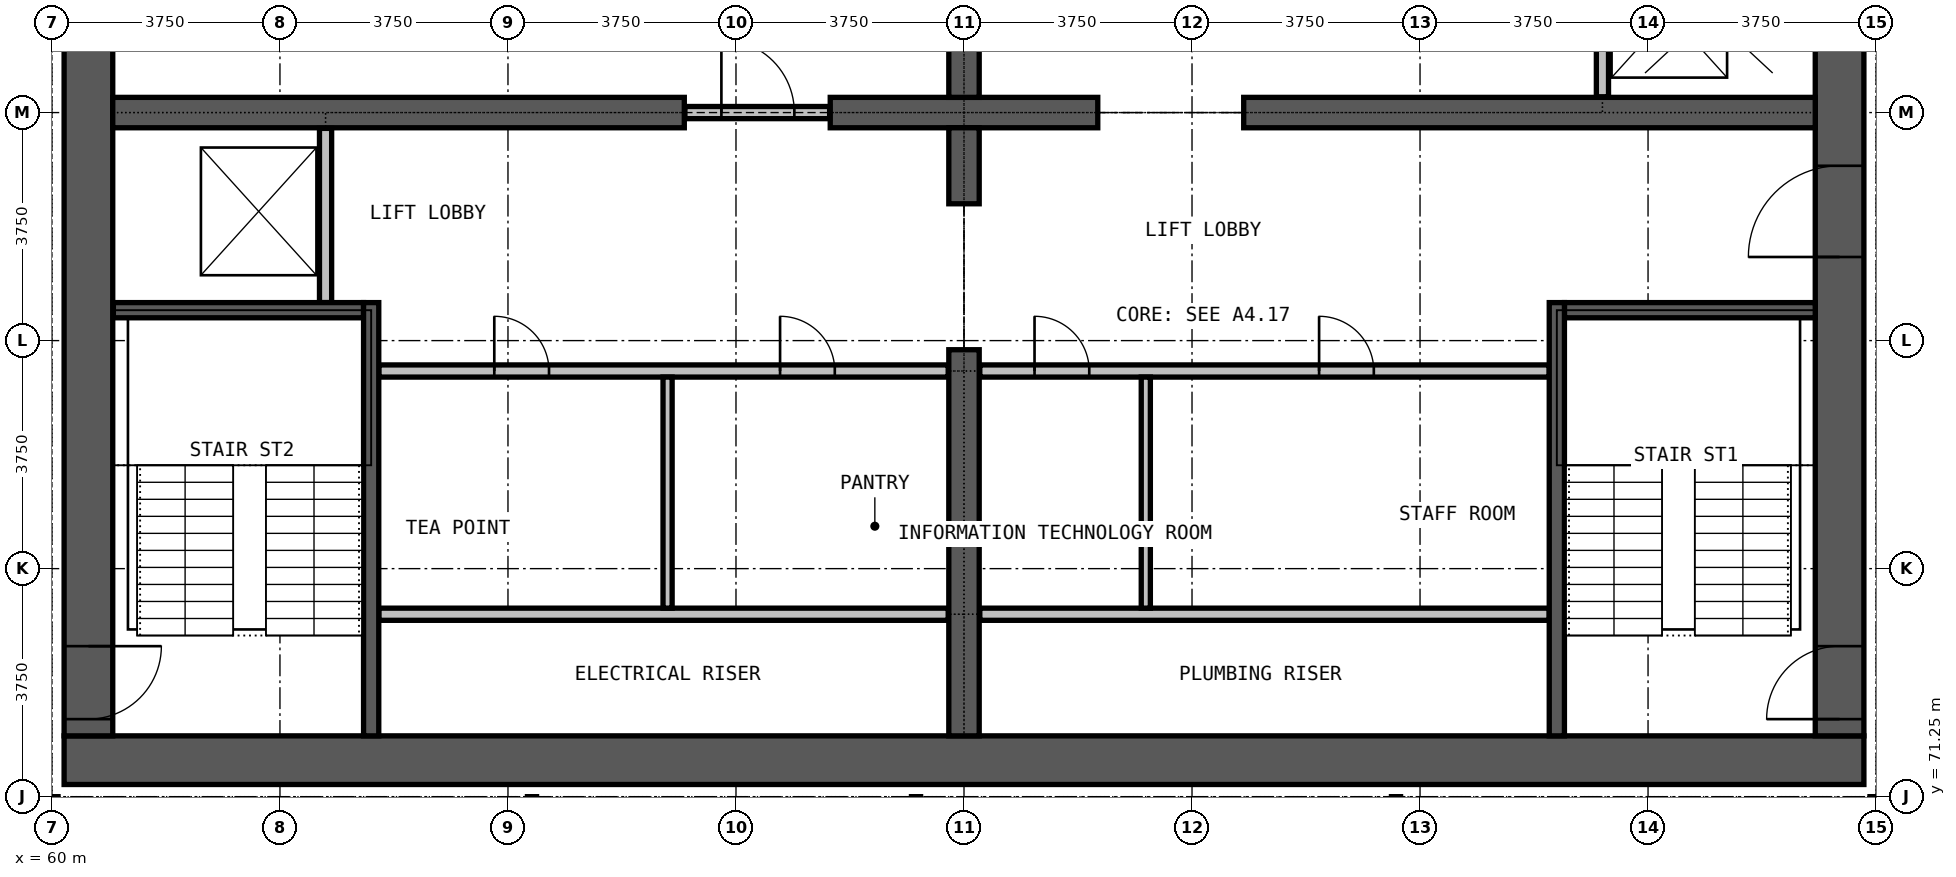
"""IFC4 building model, lengths in metres.
Left out: names, types, materials, properties, quantities, classifications, styles, units other than length and angle.
Written with IfcOpenShell. Run it as: python <this file> out.ifc"""

import sys

from ifc_helpers import new_model, si_unit, direction, frame, frame_2d, origin, place, context, subcontext, project, spatial, rectangle, extrude, element, fill, save


model = new_model("IFC4")
c1 = context("Model", 3, precision=1e-05, world=origin(), true_north=direction((0.0, 1.0)))
c2 = subcontext(c1, "Body", "Model", "MODEL_VIEW")
j1 = project(units=[si_unit("LENGTHUNIT", "METRE"), si_unit("PLANEANGLEUNIT", "RADIAN")], contexts=[c1])
p1 = place(None, origin())
s1 = spatial("IfcSite", under=j1, at=p1, CompositionType="ELEMENT")
p2 = place(p1, origin())
s2 = spatial("IfcBuilding", under=s1, at=p2, CompositionType="ELEMENT")
p3 = place(p2, frame((0.0, 0.0, 165.7)))
s3 = spatial("IfcBuildingStorey", under=s2, at=p3, CompositionType="ELEMENT", Elevation=165.7)
p4 = place(p3, frame((60.2, 71.85, 0.0), z_axis=(0.0, 0.0, 1.0), x_axis=(1.0, 0.0, 0.0)))
e1 = element("IfcWall", 1, at=p4, inside=s3, PredefinedType="SHEAR", context=c2, shape_type="SweptSolid", body=[
    extrude(rectangle(XDim=29.6, YDim=0.8, at=frame_2d((14.8, 0.0))), origin(), (0.0, 0.0, 1.0), 3.6),
])
p5 = place(p3, frame((89.4, 72.25, 0.0), z_axis=(0.0, 0.0, 1.0), x_axis=(0.0, 1.0, 0.0)))
e2 = element("IfcWall", 2, at=p5, inside=s3, PredefinedType="SHEAR", context=c2, shape_type="SweptSolid", body=[
    extrude(rectangle(XDim=20.5, YDim=0.8, at=frame_2d((10.25, 0.0))), origin(), (0.0, 0.0, 1.0), 3.6),
])
p6 = place(p5, frame((0.275, 0.0, 0.0)))
e3 = element("IfcOpeningElement", 3, at=p6, cuts=e2, PredefinedType="OPENING", context=c2, shape_type="SweptSolid", body=[
    extrude(rectangle(XDim=1.2, YDim=2.2, at=frame_2d((0.6, 1.1))), frame((0.0, 0.41, 0.0), z_axis=(0.0, -1.0, 0.0), x_axis=(1.0, 0.0, 0.0)), (0.0, 0.0, 1.0), 0.82),
])
p7 = place(p5, frame((13.775, 0.0, 0.0)))
e4 = element("IfcOpeningElement", 4, at=p7, cuts=e2, PredefinedType="OPENING", context=c2, shape_type="SweptSolid", body=[
    extrude(rectangle(XDim=1.2, YDim=2.2, at=frame_2d((0.6, 1.1))), frame((0.0, 0.41, 0.0), z_axis=(0.0, -1.0, 0.0), x_axis=(1.0, 0.0, 0.0)), (0.0, 0.0, 1.0), 0.82),
])
p8 = place(p5, frame((7.875, 0.0, 0.0)))
e5 = element("IfcOpeningElement", 5, at=p8, cuts=e2, PredefinedType="OPENING", context=c2, shape_type="SweptSolid", body=[
    extrude(rectangle(XDim=1.5, YDim=2.2, at=frame_2d((0.75, 1.1))), frame((0.0, 0.41, 0.0), z_axis=(0.0, -1.0, 0.0), x_axis=(1.0, 0.0, 0.0)), (0.0, 0.0, 1.0), 0.82),
])
p9 = place(p3, frame((60.6, 92.75, 0.0), z_axis=(0.0, 0.0, 1.0), x_axis=(0.0, -1.0, 0.0)))
e6 = element("IfcWall", 6, at=p9, inside=s3, PredefinedType="SHEAR", context=c2, shape_type="SweptSolid", body=[
    extrude(rectangle(XDim=20.5, YDim=0.8, at=frame_2d((10.25, 0.0))), origin(), (0.0, 0.0, 1.0), 3.6),
])
p10 = place(p9, frame((19.025, 0.0, 0.0)))
e7 = element("IfcOpeningElement", 7, at=p10, cuts=e6, PredefinedType="OPENING", context=c2, shape_type="SweptSolid", body=[
    extrude(rectangle(XDim=1.2, YDim=2.2, at=frame_2d((0.6, 1.1))), frame((0.0, 0.41, 0.0), z_axis=(0.0, -1.0, 0.0), x_axis=(1.0, 0.0, 0.0)), (0.0, 0.0, 1.0), 0.82),
])
p11 = place(p9, frame((8.025, 0.0, 0.0)))
e8 = element("IfcOpeningElement", 8, at=p11, cuts=e6, PredefinedType="OPENING", context=c2, shape_type="SweptSolid", body=[
    extrude(rectangle(XDim=1.2, YDim=2.2, at=frame_2d((0.6, 1.1))), frame((0.0, 0.41, 0.0), z_axis=(0.0, -1.0, 0.0), x_axis=(1.0, 0.0, 0.0)), (0.0, 0.0, 1.0), 0.82),
])
p12 = place(p3, frame((61.0, 82.5, 0.0), z_axis=(0.0, 0.0, 1.0), x_axis=(1.0, 0.0, 0.0)))
e9 = element("IfcWall", 9, at=p12, inside=s3, PredefinedType="SHEAR", context=c2, shape_type="SweptSolid", body=[
    extrude(rectangle(XDim=9.4, YDim=0.5, at=frame_2d((4.7, 0.0))), origin(), (0.0, 0.0, 1.0), 3.6),
])
p13 = place(p3, frame((72.8, 82.5, 0.0), z_axis=(0.0, 0.0, 1.0), x_axis=(1.0, 0.0, 0.0)))
e10 = element("IfcWall", 10, at=p13, inside=s3, PredefinedType="SHEAR", context=c2, shape_type="SweptSolid", body=[
    extrude(rectangle(XDim=4.4, YDim=0.5, at=frame_2d((2.2, 0.0))), origin(), (0.0, 0.0, 1.0), 3.6),
])
p14 = place(p3, frame((79.6, 82.5, 0.0), z_axis=(0.0, 0.0, 1.0), x_axis=(1.0, 0.0, 0.0)))
e11 = element("IfcWall", 11, at=p14, inside=s3, PredefinedType="SHEAR", context=c2, shape_type="SweptSolid", body=[
    extrude(rectangle(XDim=9.4, YDim=0.5, at=frame_2d((4.7, 0.0))), origin(), (0.0, 0.0, 1.0), 3.6),
])
p15 = place(p3, frame((75.0, 72.25, 0.0), z_axis=(0.0, 0.0, 1.0), x_axis=(0.0, 1.0, 0.0)))
e12 = element("IfcWall", 12, at=p15, inside=s3, PredefinedType="SHEAR", context=c2, shape_type="SweptSolid", body=[
    extrude(rectangle(XDim=6.35, YDim=0.5, at=frame_2d((3.175, 0.0))), origin(), (0.0, 0.0, 1.0), 3.6),
])
for number, where, z_axis, x_axis in (
    (13, (75.0, 81.0, 0.0), (0.0, 0.0, 1.0), (0.0, 1.0, 0.0)),
    (14, (75.0, 82.75, 0.0), (0.0, 0.0, 1.0), (0.0, 1.0, 0.0)),
):
    element("IfcWall", number, at=place(p3, frame(where, z_axis=z_axis, x_axis=x_axis)), inside=s3, PredefinedType="SHEAR", context=c2, shape_type="SweptSolid", body=[
        extrude(rectangle(XDim=1.25, YDim=0.5, at=frame_2d((0.625, 0.0))), origin(), (0.0, 0.0, 1.0), 3.6),
    ])
for number, where, z_axis, x_axis in (
    (15, (65.375, 74.25, 0.0), (0.0, 0.0, 1.0), (1.0, 0.0, 0.0)),
    (16, (75.26, 74.25, 0.0), (0.0, 0.0, 1.0), (1.0, 0.0, 0.0)),
):
    element("IfcWall", number, at=place(p3, frame(where, z_axis=z_axis, x_axis=x_axis)), inside=s3, PredefinedType="PARTITIONING", context=c2, shape_type="SweptSolid", body=[
        extrude(rectangle(XDim=9.365, YDim=0.2, at=frame_2d((4.683, 0.0))), origin(), (0.0, 0.0, 1.0), 3.3),
    ])
p16 = place(p3, frame((65.375, 78.25, 0.0), z_axis=(0.0, 0.0, 1.0), x_axis=(1.0, 0.0, 0.0)))
e17 = element("IfcWall", 17, at=p16, inside=s3, PredefinedType="PARTITIONING", context=c2, shape_type="SweptSolid", body=[
    extrude(rectangle(XDim=9.365, YDim=0.2, at=frame_2d((4.683, 0.0))), origin(), (0.0, 0.0, 1.0), 3.3),
])
p17 = place(p16, frame((1.9, 0.0, 0.0)))
e18 = element("IfcOpeningElement", 18, at=p17, cuts=e17, PredefinedType="OPENING", context=c2, shape_type="SweptSolid", body=[
    extrude(rectangle(XDim=0.9, YDim=2.2, at=frame_2d((0.45, 1.1))), frame((0.0, 0.11, 0.0), z_axis=(0.0, -1.0, 0.0), x_axis=(1.0, 0.0, 0.0)), (0.0, 0.0, 1.0), 0.22),
])
p18 = place(p16, frame((6.6, 0.0, 0.0)))
e19 = element("IfcOpeningElement", 19, at=p18, cuts=e17, PredefinedType="OPENING", context=c2, shape_type="SweptSolid", body=[
    extrude(rectangle(XDim=0.9, YDim=2.2, at=frame_2d((0.45, 1.1))), frame((0.0, 0.11, 0.0), z_axis=(0.0, -1.0, 0.0), x_axis=(1.0, 0.0, 0.0)), (0.0, 0.0, 1.0), 0.22),
])
p19 = place(p3, frame((75.26, 78.25, 0.0), z_axis=(0.0, 0.0, 1.0), x_axis=(1.0, 0.0, 0.0)))
e20 = element("IfcWall", 20, at=p19, inside=s3, PredefinedType="PARTITIONING", context=c2, shape_type="SweptSolid", body=[
    extrude(rectangle(XDim=9.365, YDim=0.2, at=frame_2d((4.683, 0.0))), origin(), (0.0, 0.0, 1.0), 3.3),
])
p20 = place(p19, frame((0.9, 0.0, 0.0)))
e21 = element("IfcOpeningElement", 21, at=p20, cuts=e20, PredefinedType="OPENING", context=c2, shape_type="SweptSolid", body=[
    extrude(rectangle(XDim=0.9, YDim=2.2, at=frame_2d((0.45, 1.1))), frame((0.0, 0.11, 0.0), z_axis=(0.0, -1.0, 0.0), x_axis=(1.0, 0.0, 0.0)), (0.0, 0.0, 1.0), 0.22),
])
p21 = place(p19, frame((5.58, 0.0, 0.0)))
e22 = element("IfcOpeningElement", 22, at=p21, cuts=e20, PredefinedType="OPENING", context=c2, shape_type="SweptSolid", body=[
    extrude(rectangle(XDim=0.9, YDim=2.2, at=frame_2d((0.45, 1.1))), frame((0.0, 0.11, 0.0), z_axis=(0.0, -1.0, 0.0), x_axis=(1.0, 0.0, 0.0)), (0.0, 0.0, 1.0), 0.22),
])
p22 = place(p3, frame((70.41, 82.5, 0.0), z_axis=(0.0, 0.0, 1.0), x_axis=(1.0, 0.0, 0.0)))
e23 = element("IfcWall", 23, at=p22, inside=s3, PredefinedType="PARTITIONING", context=c2, shape_type="SweptSolid", body=[
    extrude(rectangle(XDim=2.38, YDim=0.2, at=frame_2d((1.19, 0.0))), origin(), (0.0, 0.0, 1.0), 2.4),
])
p23 = place(p22, frame((0.6, 0.0, 0.0)))
e24 = element("IfcOpeningElement", 24, at=p23, cuts=e23, PredefinedType="OPENING", context=c2, shape_type="SweptSolid", body=[
    extrude(rectangle(XDim=1.2, YDim=2.2, at=frame_2d((0.6, 1.1))), frame((0.0, 0.11, 0.0), z_axis=(0.0, -1.0, 0.0), x_axis=(1.0, 0.0, 0.0)), (0.0, 0.0, 1.0), 0.22),
])
for number, where, z_axis, x_axis in (
    (25, (70.125, 74.35, 0.0), (0.0, 0.0, 1.0), (0.0, 1.0, 0.0)),
    (26, (77.99, 74.35, 0.0), (0.0, 0.0, 1.0), (0.0, 1.0, 0.0)),
):
    element("IfcWall", number, at=place(p3, frame(where, z_axis=z_axis, x_axis=x_axis)), inside=s3, PredefinedType="PARTITIONING", context=c2, shape_type="SweptSolid", body=[
        extrude(rectangle(XDim=3.8, YDim=0.15, at=frame_2d((1.9, 0.0))), origin(), (0.0, 0.0, 1.0), 3.3),
    ])
p24 = place(p3, frame((64.5, 79.375, 0.0), z_axis=(0.0, 0.0, 1.0), x_axis=(0.0, 1.0, 0.0)))
e27 = element("IfcWall", 27, at=p24, inside=s3, PredefinedType="PARTITIONING", context=c2, shape_type="SweptSolid", body=[
    extrude(rectangle(XDim=2.865, YDim=0.2, at=frame_2d((1.433, 0.0))), origin(), (0.0, 0.0, 1.0), 3.3),
])
p25 = place(p3, frame((85.5, 82.76, 0.0), z_axis=(0.0, 0.0, 1.0), x_axis=(0.0, 1.0, 0.0)))
e28 = element("IfcWall", 28, at=p25, inside=s3, PredefinedType="PARTITIONING", context=c2, shape_type="SweptSolid", body=[
    extrude(rectangle(XDim=2.865, YDim=0.2, at=frame_2d((1.433, 0.0))), origin(), (0.0, 0.0, 1.0), 3.3),
])
p26 = place(p25, frame((0.9, 0.0, 0.0)))
e29 = element("IfcOpeningElement", 29, at=p26, cuts=e28, PredefinedType="OPENING", context=c2, shape_type="SweptSolid", body=[
    extrude(rectangle(XDim=1.1, YDim=2.2, at=frame_2d((0.55, 1.1))), frame((0.0, 0.11, 0.0), z_axis=(0.0, -1.0, 0.0), x_axis=(1.0, 0.0, 0.0)), (0.0, 0.0, 1.0), 0.22),
])
p27 = place(p3, frame((61.01, 79.25, 0.0), z_axis=(0.0, 0.0, 1.0), x_axis=(1.0, 0.0, 0.0)))
e30 = element("IfcWall", 30, at=p27, inside=s3, PredefinedType="PARTITIONING", context=c2, shape_type="SweptSolid", body=[
    extrude(rectangle(XDim=4.115, YDim=0.25, at=frame_2d((2.058, 0.0))), origin(), (0.0, 0.0, 1.0), 3.3),
])
p28 = place(p3, frame((84.875, 79.25, 0.0), z_axis=(0.0, 0.0, 1.0), x_axis=(1.0, 0.0, 0.0)))
e31 = element("IfcWall", 31, at=p28, inside=s3, PredefinedType="PARTITIONING", context=c2, shape_type="SweptSolid", body=[
    extrude(rectangle(XDim=4.125, YDim=0.25, at=frame_2d((2.062, 0.0))), origin(), (0.0, 0.0, 1.0), 3.3),
])
for number, where, z_axis, x_axis in (
    (32, (65.25, 72.25, 0.0), (0.0, 0.0, 1.0), (0.0, 1.0, 0.0)),
    (33, (84.75, 72.25, 0.0), (0.0, 0.0, 1.0), (0.0, 1.0, 0.0)),
):
    element("IfcWall", number, at=place(p3, frame(where, z_axis=z_axis, x_axis=x_axis)), inside=s3, PredefinedType="PARTITIONING", context=c2, shape_type="SweptSolid", body=[
        extrude(rectangle(XDim=7.125, YDim=0.25, at=frame_2d((3.562, 0.0))), origin(), (0.0, 0.0, 1.0), 3.3),
    ])
p29 = place(p23, origin())
e34 = element("IfcDoor", 34, at=p29, inside=s3, OperationType="SINGLE_SWING_LEFT", PredefinedType="DOOR", context=c2, shape_type="SweptSolid", body=[
    extrude(rectangle(XDim=1.2, YDim=2.2, at=frame_2d((0.6, 1.1))), frame((0.0, 0.025, 0.0), z_axis=(0.0, -1.0, 0.0), x_axis=(1.0, 0.0, 0.0)), (0.0, 0.0, 1.0), 0.05),
])
fill(e24, e34)
p30 = place(p6, origin())
e35 = element("IfcDoor", 35, at=p30, inside=s3, OperationType="SINGLE_SWING_LEFT", PredefinedType="DOOR", context=c2, shape_type="SweptSolid", body=[
    extrude(rectangle(XDim=1.2, YDim=2.2, at=frame_2d((0.6, 1.1))), frame((0.0, 0.025, 0.0), z_axis=(0.0, -1.0, 0.0), x_axis=(1.0, 0.0, 0.0)), (0.0, 0.0, 1.0), 0.05),
])
fill(e3, e35)
p31 = place(p10, origin())
e36 = element("IfcDoor", 36, at=p31, inside=s3, OperationType="SINGLE_SWING_LEFT", PredefinedType="DOOR", context=c2, shape_type="SweptSolid", body=[
    extrude(rectangle(XDim=1.2, YDim=2.2, at=frame_2d((0.6, 1.1))), frame((0.0, 0.025, 0.0), z_axis=(0.0, -1.0, 0.0), x_axis=(1.0, 0.0, 0.0)), (0.0, 0.0, 1.0), 0.05),
])
fill(e7, e36)
p32 = place(p8, origin())
e37 = element("IfcDoor", 37, at=p32, inside=s3, OperationType="DOUBLE_DOOR_SINGLE_SWING", PredefinedType="DOOR", context=c2, shape_type="SweptSolid", body=[
    extrude(rectangle(XDim=1.5, YDim=2.2, at=frame_2d((0.75, 1.1))), frame((0.0, 0.025, 0.0), z_axis=(0.0, -1.0, 0.0), x_axis=(1.0, 0.0, 0.0)), (0.0, 0.0, 1.0), 0.05),
])
fill(e5, e37)
p33 = place(p17, origin())
e38 = element("IfcDoor", 38, at=p33, inside=s3, OperationType="SINGLE_SWING_LEFT", PredefinedType="DOOR", context=c2, shape_type="SweptSolid", body=[
    extrude(rectangle(XDim=0.9, YDim=2.2, at=frame_2d((0.45, 1.1))), frame((0.0, 0.025, 0.0), z_axis=(0.0, -1.0, 0.0), x_axis=(1.0, 0.0, 0.0)), (0.0, 0.0, 1.0), 0.05),
])
fill(e18, e38)
p34 = place(p18, origin())
e39 = element("IfcDoor", 39, at=p34, inside=s3, OperationType="SINGLE_SWING_LEFT", PredefinedType="DOOR", context=c2, shape_type="SweptSolid", body=[
    extrude(rectangle(XDim=0.9, YDim=2.2, at=frame_2d((0.45, 1.1))), frame((0.0, 0.025, 0.0), z_axis=(0.0, -1.0, 0.0), x_axis=(1.0, 0.0, 0.0)), (0.0, 0.0, 1.0), 0.05),
])
fill(e19, e39)
p35 = place(p20, origin())
e40 = element("IfcDoor", 40, at=p35, inside=s3, OperationType="SINGLE_SWING_RIGHT", PredefinedType="DOOR", context=c2, shape_type="SweptSolid", body=[
    extrude(rectangle(XDim=0.9, YDim=2.2, at=frame_2d((0.45, 1.1))), frame((0.0, 0.025, 0.0), z_axis=(0.0, -1.0, 0.0), x_axis=(1.0, 0.0, 0.0)), (0.0, 0.0, 1.0), 0.05),
])
fill(e21, e40)
p36 = place(p21, origin())
e41 = element("IfcDoor", 41, at=p36, inside=s3, OperationType="SINGLE_SWING_RIGHT", PredefinedType="DOOR", context=c2, shape_type="SweptSolid", body=[
    extrude(rectangle(XDim=0.9, YDim=2.2, at=frame_2d((0.45, 1.1))), frame((0.0, 0.025, 0.0), z_axis=(0.0, -1.0, 0.0), x_axis=(1.0, 0.0, 0.0)), (0.0, 0.0, 1.0), 0.05),
])
fill(e22, e41)
save(model, sys.argv[1])
